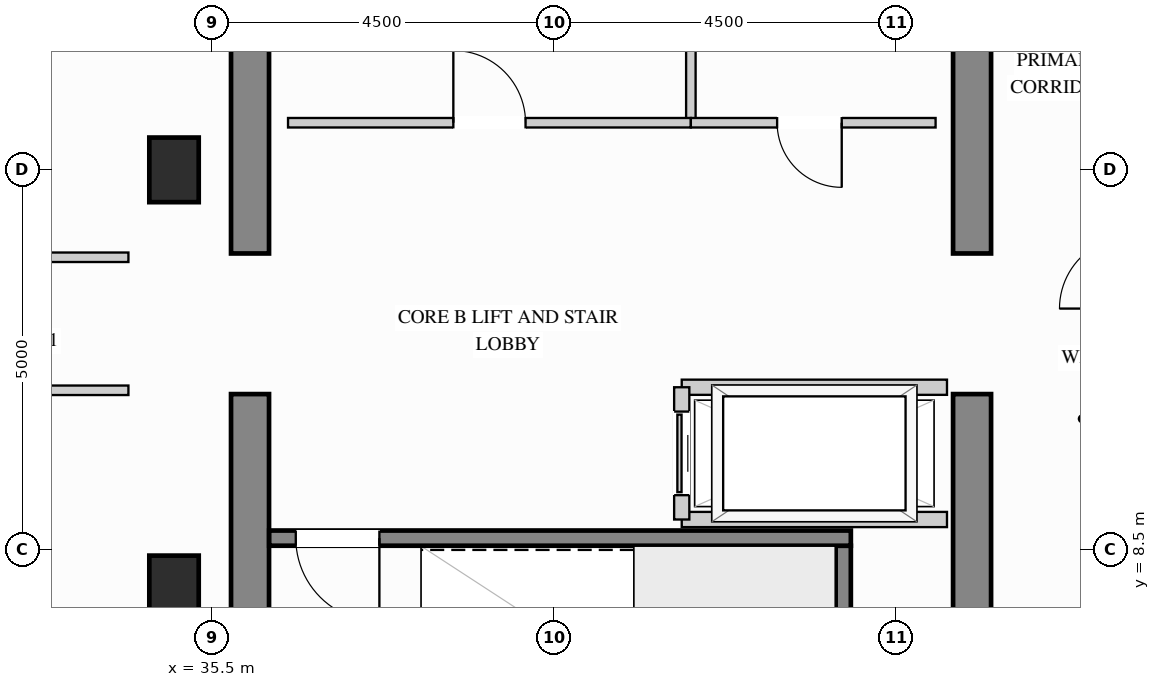
"""IFC4 building model, lengths in metres.
Left out: names, types, materials, properties, quantities, classifications, styles, units other than length and angle.
Written with IfcOpenShell. Run it as: python <this file> out.ifc"""

import sys

from ifc_helpers import new_model, si_unit, direction, frame, frame_2d, origin, origin_2d, place, context, subcontext, project, spatial, rectangle, extrude, source, transform, mapped, element, fill, save


model = new_model("IFC4")
c1 = context("Model", 3, precision=1e-05, world=origin(), true_north=direction((0.0, 1.0)))
c2 = subcontext(c1, "Body", "Model", "MODEL_VIEW")
j1 = project(units=[si_unit("LENGTHUNIT", "METRE"), si_unit("PLANEANGLEUNIT", "RADIAN")], contexts=[c1])
p1 = place(None, origin())
s1 = spatial("IfcSite", under=j1, at=p1, CompositionType="ELEMENT")
p2 = place(p1, origin())
s2 = spatial("IfcBuilding", under=s1, at=p2, CompositionType="ELEMENT")
p3 = place(p2, frame((0.0, 0.0, 219.6)))
s3 = spatial("IfcBuildingStorey", under=s2, at=p3, CompositionType="ELEMENT", Elevation=219.6)
m1 = source(origin(), c2, "Body", "SweptSolid", [
    extrude(rectangle(XDim=0.65, YDim=0.85, at=origin_2d()), origin(), (0.0, 0.0, 1.0), 3.4),
])
for number, where, z_axis, x_axis in (
    (1, (35.0, 13.5, 0.0), (0.0, 0.0, 1.0), (1.0, 0.0, 0.0)),
    (2, (35.0, 8.0, 0.0), (0.0, 0.0, 1.0), (1.0, 0.0, 0.0)),
):
    element("IfcColumn", number, at=place(p3, frame(where, z_axis=z_axis, x_axis=x_axis)), inside=s3, PredefinedType="COLUMN", context=c2, shape_type="MappedRepresentation", body=[
        mapped(m1, transform((0.0, 0.0, 0.0), x_axis=(1.0, 0.0, 0.0), y_axis=(0.0, 1.0, 0.0), z_axis=(0.0, 0.0, 1.0))),
    ])
m2 = source(origin(), c2, "Body", "SweptSolid", [
    extrude(rectangle(XDim=5.8, YDim=0.5, at=frame_2d((2.9, 0.0))), origin(), (0.0, 0.0, 1.0), 3.4),
])
p4 = place(p3, frame((45.5, 4.75, 0.0), z_axis=(0.0, 0.0, 1.0), x_axis=(0.0, 1.0, 0.0)))
e3 = element("IfcWall", 3, at=p4, inside=s3, PredefinedType="SHEAR", context=c2, shape_type="MappedRepresentation", body=[
    mapped(m2, transform((0.0, 0.0, 0.0), x_axis=(1.0, 0.0, 0.0), y_axis=(0.0, 1.0, 0.0), z_axis=(0.0, 0.0, 1.0))),
])
m3 = source(origin(), c2, "Body", "SweptSolid", [
    extrude(rectangle(XDim=3.85, YDim=0.5, at=frame_2d((1.925, 0.0))), origin(), (0.0, 0.0, 1.0), 3.4),
])
p5 = place(p3, frame((45.5, 12.4, 0.0), z_axis=(0.0, 0.0, 1.0), x_axis=(0.0, 1.0, 0.0)))
e4 = element("IfcWall", 4, at=p5, inside=s3, PredefinedType="SHEAR", context=c2, shape_type="MappedRepresentation", body=[
    mapped(m3, transform((0.0, 0.0, 0.0), x_axis=(1.0, 0.0, 0.0), y_axis=(0.0, 1.0, 0.0), z_axis=(0.0, 0.0, 1.0))),
])
p6 = place(p3, frame((36.0, 4.75, 0.0), z_axis=(0.0, 0.0, 1.0), x_axis=(0.0, 1.0, 0.0)))
e5 = element("IfcWall", 5, at=p6, inside=s3, PredefinedType="SHEAR", context=c2, shape_type="MappedRepresentation", body=[
    mapped(m2, transform((0.0, 0.0, 0.0), x_axis=(1.0, 0.0, 0.0), y_axis=(0.0, 1.0, 0.0), z_axis=(0.0, 0.0, 1.0))),
])
p7 = place(p3, frame((36.0, 12.4, 0.0), z_axis=(0.0, 0.0, 1.0), x_axis=(0.0, 1.0, 0.0)))
e6 = element("IfcWall", 6, at=p7, inside=s3, PredefinedType="SHEAR", context=c2, shape_type="MappedRepresentation", body=[
    mapped(m3, transform((0.0, 0.0, 0.0), x_axis=(1.0, 0.0, 0.0), y_axis=(0.0, 1.0, 0.0), z_axis=(0.0, 0.0, 1.0))),
])
m4 = source(origin(), c2, "Body", "SweptSolid", [
    extrude(rectangle(XDim=1.93, YDim=0.125, at=frame_2d((0.965, 0.0))), origin(), (0.0, 0.0, 1.0), 3.385),
])
p8 = place(p3, frame((41.8, 14.12, 0.0), z_axis=(0.0, 0.0, 1.0), x_axis=(0.0, 1.0, 0.0)))
e7 = element("IfcWall", 7, at=p8, inside=s3, PredefinedType="PARTITIONING", context=c2, shape_type="MappedRepresentation", body=[
    mapped(m4, transform((0.0, 0.0, 0.0), x_axis=(1.0, 0.0, 0.0), y_axis=(0.0, 1.0, 0.0), z_axis=(0.0, 0.0, 1.0))),
])
p9 = place(p3, frame((36.5, 14.12, 0.0), z_axis=(0.0, 0.0, 1.0), x_axis=(1.0, 0.0, 0.0)))
e8 = element("IfcWall", 8, at=p9, inside=s3, PredefinedType="PARTITIONING", context=c2, shape_type="SweptSolid", body=[
    extrude(rectangle(XDim=5.3, YDim=0.125, at=frame_2d((2.65, 0.0))), origin(), (0.0, 0.0, 1.0), 3.385),
])
p10 = place(p9, frame((2.175, 0.0, 0.0)))
e9 = element("IfcOpeningElement", 9, at=p10, cuts=e8, PredefinedType="OPENING", context=c2, shape_type="SweptSolid", body=[
    extrude(rectangle(XDim=0.95, YDim=2.15, at=frame_2d((0.475, 1.075))), frame((0.0, 0.073, 0.0), z_axis=(0.0, -1.0, 0.0), x_axis=(1.0, 0.0, 0.0)), (0.0, 0.0, 1.0), 0.145),
])
p11 = place(p3, frame((41.8, 14.12, 0.0), z_axis=(0.0, 0.0, 1.0), x_axis=(1.0, 0.0, 0.0)))
e10 = element("IfcWall", 10, at=p11, inside=s3, PredefinedType="PARTITIONING", context=c2, shape_type="SweptSolid", body=[
    extrude(rectangle(XDim=3.22, YDim=0.125, at=frame_2d((1.61, 0.0))), origin(), (0.0, 0.0, 1.0), 3.385),
])
p12 = place(p11, frame((1.135, 0.0, 0.0)))
e11 = element("IfcOpeningElement", 11, at=p12, cuts=e10, PredefinedType="OPENING", context=c2, shape_type="SweptSolid", body=[
    extrude(rectangle(XDim=0.85, YDim=2.1, at=frame_2d((0.425, 1.05))), frame((0.0, 0.073, 0.0), z_axis=(0.0, -1.0, 0.0), x_axis=(1.0, 0.0, 0.0)), (0.0, 0.0, 1.0), 0.145),
])
p13 = place(p3, frame((29.85, 12.35, 0.0), z_axis=(0.0, 0.0, 1.0), x_axis=(1.0, 0.0, 0.0)))
e12 = element("IfcWall", 12, at=p13, inside=s3, PredefinedType="PARTITIONING", context=c2, shape_type="SweptSolid", body=[
    extrude(rectangle(XDim=4.55, YDim=0.125, at=frame_2d((2.275, 0.0))), origin(), (0.0, 0.0, 1.0), 3.385),
])
p14 = place(p13, frame((1.8, 0.0, 0.0)))
e13 = element("IfcOpeningElement", 13, at=p14, cuts=e12, PredefinedType="OPENING", context=c2, shape_type="SweptSolid", body=[
    extrude(rectangle(XDim=0.95, YDim=2.15, at=frame_2d((0.475, 1.075))), frame((0.0, 0.073, 0.0), z_axis=(0.0, -1.0, 0.0), x_axis=(1.0, 0.0, 0.0)), (0.0, 0.0, 1.0), 0.145),
])
p15 = place(p3, frame((29.85, 10.6, 0.0), z_axis=(0.0, 0.0, 1.0), x_axis=(1.0, 0.0, 0.0)))
e14 = element("IfcWall", 14, at=p15, inside=s3, PredefinedType="PARTITIONING", context=c2, shape_type="SweptSolid", body=[
    extrude(rectangle(XDim=4.55, YDim=0.125, at=frame_2d((2.275, 0.0))), origin(), (0.0, 0.0, 1.0), 3.385),
])
p16 = place(p15, frame((1.8, 0.0, 0.0)))
e15 = element("IfcOpeningElement", 15, at=p16, cuts=e14, PredefinedType="OPENING", context=c2, shape_type="SweptSolid", body=[
    extrude(rectangle(XDim=0.95, YDim=2.15, at=frame_2d((0.475, 1.075))), frame((0.0, 0.073, 0.0), z_axis=(0.0, -1.0, 0.0), x_axis=(1.0, 0.0, 0.0)), (0.0, 0.0, 1.0), 0.145),
])
m5 = source(origin(), c2, "Body", "SweptSolid", [
    extrude(rectangle(XDim=3.49, YDim=0.2, at=frame_2d((1.745, 0.0))), origin(), (0.0, 0.0, 1.0), 3.385),
])
for number, where, z_axis, x_axis in (
    (16, (41.68, 10.64, 0.0), (0.0, 0.0, 1.0), (1.0, 0.0, 0.0)),
    (17, (41.68, 8.9, 0.0), (0.0, 0.0, 1.0), (1.0, 0.0, 0.0)),
):
    element("IfcWall", number, at=place(p3, frame(where, z_axis=z_axis, x_axis=x_axis)), inside=s3, PredefinedType="PARTITIONING", context=c2, shape_type="MappedRepresentation", body=[
        mapped(m5, transform((0.0, 0.0, 0.0), x_axis=(1.0, 0.0, 0.0), y_axis=(0.0, 1.0, 0.0), z_axis=(0.0, 0.0, 1.0))),
    ])
p17 = place(p3, frame((41.68, 8.9, 0.0), z_axis=(0.0, 0.0, 1.0), x_axis=(0.0, 1.0, 0.0)))
e18 = element("IfcWall", 18, at=p17, inside=s3, PredefinedType="PARTITIONING", context=c2, shape_type="SweptSolid", body=[
    extrude(rectangle(XDim=1.74, YDim=0.2, at=frame_2d((0.87, 0.0))), origin(), (0.0, 0.0, 1.0), 3.385),
])
p18 = place(p17, frame((0.32, 0.0, 0.0)))
e19 = element("IfcOpeningElement", 19, at=p18, cuts=e18, PredefinedType="OPENING", context=c2, shape_type="SweptSolid", body=[
    extrude(rectangle(XDim=1.1, YDim=2.2, at=frame_2d((0.55, 1.1))), frame((0.0, 0.11, 0.0), z_axis=(0.0, -1.0, 0.0), x_axis=(1.0, 0.0, 0.0)), (0.0, 0.0, 1.0), 0.22),
])
m6 = source(origin(), c2, "Body", "SweptSolid", [
    extrude(rectangle(XDim=3.803, YDim=0.2, at=frame_2d((1.901, 0.0))), origin(), (0.0, 0.0, 1.0), 3.4),
])
p19 = place(p3, frame((43.805, 4.752, 0.0), z_axis=(0.0, 0.0, 1.0), x_axis=(0.0, 1.0, 0.0)))
e20 = element("IfcWall", 20, at=p19, inside=s3, PredefinedType="SHEAR", context=c2, shape_type="MappedRepresentation", body=[
    mapped(m6, transform((0.0, 0.0, 0.0), x_axis=(1.0, 0.0, 0.0), y_axis=(0.0, 1.0, 0.0), z_axis=(0.0, 0.0, 1.0))),
])
p20 = place(p3, frame((36.252, 8.655, 0.0), z_axis=(0.0, 0.0, 1.0), x_axis=(1.0, 0.0, 0.0)))
e21 = element("IfcWall", 21, at=p20, inside=s3, PredefinedType="SHEAR", context=c2, shape_type="SweptSolid", body=[
    extrude(rectangle(XDim=7.653, YDim=0.2, at=frame_2d((3.827, 0.0))), origin(), (0.0, 0.0, 1.0), 3.4),
])
p21 = place(p20, frame((0.35, 0.0, 0.0)))
e22 = element("IfcOpeningElement", 22, at=p21, cuts=e21, PredefinedType="OPENING", context=c2, shape_type="SweptSolid", body=[
    extrude(rectangle(XDim=1.1, YDim=2.15, at=frame_2d((0.55, 1.075))), frame((0.0, 0.11, 0.0), z_axis=(0.0, -1.0, 0.0), x_axis=(1.0, 0.0, 0.0)), (0.0, 0.0, 1.0), 0.22),
])
m7 = source(origin(), c2, "Body", "SweptSolid", [
    extrude(rectangle(XDim=1.1, YDim=2.2, at=frame_2d((0.55, 1.1))), frame((0.0, 0.025, 0.0), z_axis=(0.0, -1.0, 0.0), x_axis=(1.0, 0.0, 0.0)), (0.0, 0.0, 1.0), 0.05),
])
p22 = place(p18, origin())
e23 = element("IfcDoor", 23, at=p22, inside=s3, OperationType="SLIDING_TO_LEFT", PredefinedType="DOOR", context=c2, shape_type="MappedRepresentation", body=[
    mapped(m7, transform((0.0, 0.0, 0.0), x_axis=(1.0, 0.0, 0.0), y_axis=(0.0, 1.0, 0.0), z_axis=(0.0, 0.0, 1.0))),
])
fill(e19, e23)
m8 = source(origin(), c2, "Body", "SweptSolid", [
    extrude(rectangle(XDim=0.95, YDim=2.15, at=frame_2d((0.475, 1.075))), frame((0.0, 0.025, 0.0), z_axis=(0.0, -1.0, 0.0), x_axis=(1.0, 0.0, 0.0)), (0.0, 0.0, 1.0), 0.05),
])
p23 = place(p10, origin())
e24 = element("IfcDoor", 24, at=p23, inside=s3, OperationType="SINGLE_SWING_LEFT", PredefinedType="DOOR", context=c2, shape_type="MappedRepresentation", body=[
    mapped(m8, transform((0.0, 0.0, 0.0), x_axis=(1.0, 0.0, 0.0), y_axis=(0.0, 1.0, 0.0), z_axis=(0.0, 0.0, 1.0))),
])
fill(e9, e24)
m9 = source(origin(), c2, "Body", "SweptSolid", [
    extrude(rectangle(XDim=0.85, YDim=2.1, at=frame_2d((0.425, 1.05))), frame((0.0, 0.025, 0.0), z_axis=(0.0, -1.0, 0.0), x_axis=(1.0, 0.0, 0.0)), (0.0, 0.0, 1.0), 0.05),
])
p24 = place(p12, origin())
e25 = element("IfcDoor", 25, at=p24, inside=s3, OperationType="SINGLE_SWING_RIGHT", PredefinedType="DOOR", context=c2, shape_type="MappedRepresentation", body=[
    mapped(m9, transform((0.0, 0.0, 0.0), x_axis=(1.0, 0.0, 0.0), y_axis=(0.0, 1.0, 0.0), z_axis=(0.0, 0.0, 1.0))),
])
fill(e11, e25)
m10 = source(origin(), c2, "Body", "SweptSolid", [
    extrude(rectangle(XDim=1.1, YDim=2.15, at=frame_2d((0.55, 1.075))), frame((0.0, 0.025, 0.0), z_axis=(0.0, -1.0, 0.0), x_axis=(1.0, 0.0, 0.0)), (0.0, 0.0, 1.0), 0.05),
])
p25 = place(p21, origin())
e26 = element("IfcDoor", 26, at=p25, inside=s3, OperationType="SINGLE_SWING_RIGHT", PredefinedType="DOOR", context=c2, shape_type="MappedRepresentation", body=[
    mapped(m10, transform((0.0, 0.0, 0.0), x_axis=(1.0, 0.0, 0.0), y_axis=(0.0, 1.0, 0.0), z_axis=(0.0, 0.0, 1.0))),
])
fill(e22, e26)
save(model, sys.argv[1])
